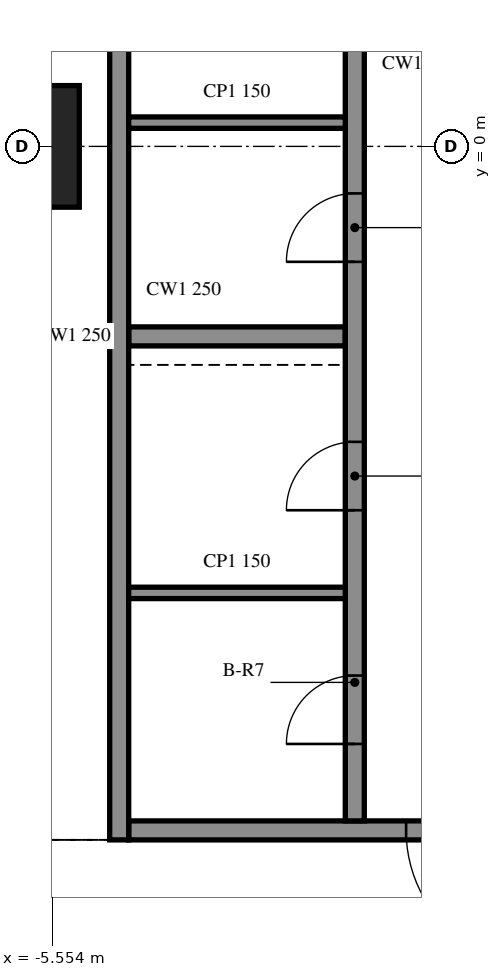
"""IFC4 building model, lengths in metres.
Left out: names, types, materials, properties, quantities, classifications, styles, units other than length and angle.
Written with IfcOpenShell. Run it as: python <this file> out.ifc"""

import sys

from ifc_helpers import new_model, si_unit, direction, frame, frame_2d, origin, origin_2d, place, context, subcontext, project, spatial, rectangle, extrude, element, fill, save


model = new_model("IFC4")
c1 = context("Model", 3, precision=1e-05, world=origin(), true_north=direction((0.0, 1.0)))
c2 = subcontext(c1, "Body", "Model", "MODEL_VIEW")
j1 = project(units=[si_unit("LENGTHUNIT", "METRE"), si_unit("PLANEANGLEUNIT", "RADIAN")], contexts=[c1])
p1 = place(None, origin())
s1 = spatial("IfcSite", under=j1, at=p1, CompositionType="ELEMENT")
p2 = place(p1, origin())
s2 = spatial("IfcBuilding", under=s1, at=p2, CompositionType="ELEMENT")
p3 = place(p2, frame((0.0, 0.0, 41.6)))
s3 = spatial("IfcBuildingStorey", under=s2, at=p3, CompositionType="ELEMENT", Elevation=41.6)
p4 = place(p3, frame((-6.0, 0.0, -0.55), z_axis=(0.0, 0.0, 1.0), x_axis=(1.0, 0.0, 0.0)))
e1 = element("IfcColumn", 1, at=p4, inside=s3, PredefinedType="COLUMN", context=c2, shape_type="SweptSolid", body=[
    extrude(rectangle(XDim=1.6, YDim=1.6, at=origin_2d()), origin(), (0.0, 0.0, 1.0), 4.61),
])
p5 = place(p3, frame((-4.675, 15.125, 0.0), z_axis=(0.0, 0.0, 1.0), x_axis=(0.0, -1.0, 0.0)))
e2 = element("IfcWall", 2, at=p5, inside=s3, PredefinedType="SOLIDWALL", context=c2, shape_type="SweptSolid", body=[
    extrude(rectangle(XDim=24.25, YDim=0.25, at=frame_2d((12.125, 0.0))), origin(), (0.0, 0.0, 1.0), 4.06),
])
p6 = place(p3, frame((4.55, -9.0, 0.0), z_axis=(0.0, 0.0, 1.0), x_axis=(-1.0, 0.0, 0.0)))
e3 = element("IfcWall", 3, at=p6, inside=s3, PredefinedType="SOLIDWALL", context=c2, shape_type="SweptSolid", body=[
    extrude(rectangle(XDim=9.1, YDim=0.25, at=frame_2d((4.55, 0.0))), origin(), (0.0, 0.0, 1.0), 4.06),
])
p7 = place(p6, frame((3.65, 0.0, 0.0)))
e4 = element("IfcOpeningElement", 4, at=p7, cuts=e3, PredefinedType="OPENING", context=c2, shape_type="SweptSolid", body=[
    extrude(rectangle(XDim=1.8, YDim=2.1, at=frame_2d((0.9, 1.05))), frame((0.0, 0.135, 0.0), z_axis=(0.0, -1.0, 0.0), x_axis=(1.0, 0.0, 0.0)), (0.0, 0.0, 1.0), 0.27),
])
p8 = place(p3, frame((-1.575, -8.875, 0.0), z_axis=(0.0, 0.0, 1.0), x_axis=(0.0, 1.0, 0.0)))
e5 = element("IfcWall", 5, at=p8, inside=s3, PredefinedType="SOLIDWALL", context=c2, shape_type="SweptSolid", body=[
    extrude(rectangle(XDim=23.75, YDim=0.25, at=frame_2d((11.875, 0.0))), origin(), (0.0, 0.0, 1.0), 4.06),
])
p9 = place(p8, frame((7.356, 0.0, 0.0)))
e6 = element("IfcOpeningElement", 6, at=p9, cuts=e5, PredefinedType="OPENING", context=c2, shape_type="SweptSolid", body=[
    extrude(rectangle(XDim=0.9, YDim=2.1, at=frame_2d((0.45, 1.05))), frame((0.0, 0.135, 0.0), z_axis=(0.0, -1.0, 0.0), x_axis=(1.0, 0.0, 0.0)), (0.0, 0.0, 1.0), 0.27),
])
p10 = place(p8, frame((11.425, 0.0, 0.0)))
e7 = element("IfcOpeningElement", 7, at=p10, cuts=e5, PredefinedType="OPENING", context=c2, shape_type="SweptSolid", body=[
    extrude(rectangle(XDim=0.9, YDim=2.1, at=frame_2d((0.45, 1.05))), frame((0.0, 0.135, 0.0), z_axis=(0.0, -1.0, 0.0), x_axis=(1.0, 0.0, 0.0)), (0.0, 0.0, 1.0), 0.27),
])
p11 = place(p8, frame((15.494, 0.0, 0.0)))
e8 = element("IfcOpeningElement", 8, at=p11, cuts=e5, PredefinedType="OPENING", context=c2, shape_type="SweptSolid", body=[
    extrude(rectangle(XDim=0.9, YDim=2.1, at=frame_2d((0.45, 1.05))), frame((0.0, 0.135, 0.0), z_axis=(0.0, -1.0, 0.0), x_axis=(1.0, 0.0, 0.0)), (0.0, 0.0, 1.0), 0.27),
])
p12 = place(p8, frame((1.012, 0.0, 0.0)))
e9 = element("IfcOpeningElement", 9, at=p12, cuts=e5, PredefinedType="OPENING", context=c2, shape_type="SweptSolid", body=[
    extrude(rectangle(XDim=0.9, YDim=2.1, at=frame_2d((0.45, 1.05))), frame((0.0, 0.135, 0.0), z_axis=(0.0, -1.0, 0.0), x_axis=(1.0, 0.0, 0.0)), (0.0, 0.0, 1.0), 0.27),
])
p13 = place(p8, frame((4.087, 0.0, 0.0)))
e10 = element("IfcOpeningElement", 10, at=p13, cuts=e5, PredefinedType="OPENING", context=c2, shape_type="SweptSolid", body=[
    extrude(rectangle(XDim=0.9, YDim=2.1, at=frame_2d((0.45, 1.05))), frame((0.0, 0.135, 0.0), z_axis=(0.0, -1.0, 0.0), x_axis=(1.0, 0.0, 0.0)), (0.0, 0.0, 1.0), 0.27),
])
p14 = place(p8, frame((18.262, 0.0, 0.0)))
e11 = element("IfcOpeningElement", 11, at=p14, cuts=e5, PredefinedType="OPENING", context=c2, shape_type="SweptSolid", body=[
    extrude(rectangle(XDim=0.9, YDim=2.1, at=frame_2d((0.45, 1.05))), frame((0.0, 0.135, 0.0), z_axis=(0.0, -1.0, 0.0), x_axis=(1.0, 0.0, 0.0)), (0.0, 0.0, 1.0), 0.27),
])
p15 = place(p8, frame((20.3, 0.0, 0.0)))
e12 = element("IfcOpeningElement", 12, at=p15, cuts=e5, PredefinedType="OPENING", context=c2, shape_type="SweptSolid", body=[
    extrude(rectangle(XDim=0.9, YDim=2.1, at=frame_2d((0.45, 1.05))), frame((0.0, 0.135, 0.0), z_axis=(0.0, -1.0, 0.0), x_axis=(1.0, 0.0, 0.0)), (0.0, 0.0, 1.0), 0.27),
])
p16 = place(p8, frame((22.337, 0.0, 0.0)))
e13 = element("IfcOpeningElement", 13, at=p16, cuts=e5, PredefinedType="OPENING", context=c2, shape_type="SweptSolid", body=[
    extrude(rectangle(XDim=0.9, YDim=2.1, at=frame_2d((0.45, 1.05))), frame((0.0, 0.135, 0.0), z_axis=(0.0, -1.0, 0.0), x_axis=(1.0, 0.0, 0.0)), (0.0, 0.0, 1.0), 0.27),
])
p17 = place(p3, frame((-4.55, -2.5, 0.0), z_axis=(0.0, 0.0, 1.0), x_axis=(1.0, 0.0, 0.0)))
e14 = element("IfcWall", 14, at=p17, inside=s3, PredefinedType="SOLIDWALL", context=c2, shape_type="SweptSolid", body=[
    extrude(rectangle(XDim=2.85, YDim=0.25, at=frame_2d((1.425, 0.0))), origin(), (0.0, 0.0, 1.0), 4.06),
])
for number, where, z_axis, x_axis in (
    (15, (-4.55, 0.312, 0.0), (0.0, 0.0, 1.0), (1.0, 0.0, 0.0)),
    (16, (-4.55, -5.875, 0.0), (0.0, 0.0, 1.0), (1.0, 0.0, 0.0)),
):
    element("IfcWall", number, at=place(p3, frame(where, z_axis=z_axis, x_axis=x_axis)), inside=s3, PredefinedType="PARTITIONING", context=c2, shape_type="SweptSolid", body=[
        extrude(rectangle(XDim=2.85, YDim=0.15, at=frame_2d((1.425, 0.0))), origin(), (0.0, 0.0, 1.0), 4.06),
    ])
p18 = place(p7, origin())
e17 = element("IfcDoor", 17, at=p18, inside=s3, OperationType="DOUBLE_DOOR_SINGLE_SWING", PredefinedType="DOOR", context=c2, shape_type="SweptSolid", body=[
    extrude(rectangle(XDim=1.8, YDim=2.1, at=frame_2d((0.9, 1.05))), frame((0.0, 0.025, 0.0), z_axis=(0.0, -1.0, 0.0), x_axis=(1.0, 0.0, 0.0)), (0.0, 0.0, 1.0), 0.05),
])
fill(e4, e17)
p19 = place(p9, origin())
e18 = element("IfcDoor", 18, at=p19, inside=s3, OperationType="SINGLE_SWING_LEFT", PredefinedType="DOOR", context=c2, shape_type="SweptSolid", body=[
    extrude(rectangle(XDim=0.9, YDim=2.1, at=frame_2d((0.45, 1.05))), frame((0.0, 0.025, 0.0), z_axis=(0.0, -1.0, 0.0), x_axis=(1.0, 0.0, 0.0)), (0.0, 0.0, 1.0), 0.05),
])
fill(e6, e18)
p20 = place(p12, origin())
e19 = element("IfcDoor", 19, at=p20, inside=s3, OperationType="SINGLE_SWING_LEFT", PredefinedType="DOOR", context=c2, shape_type="SweptSolid", body=[
    extrude(rectangle(XDim=0.9, YDim=2.1, at=frame_2d((0.45, 1.05))), frame((0.0, 0.025, 0.0), z_axis=(0.0, -1.0, 0.0), x_axis=(1.0, 0.0, 0.0)), (0.0, 0.0, 1.0), 0.05),
])
fill(e9, e19)
p21 = place(p13, origin())
e20 = element("IfcDoor", 20, at=p21, inside=s3, OperationType="SINGLE_SWING_RIGHT", PredefinedType="DOOR", context=c2, shape_type="SweptSolid", body=[
    extrude(rectangle(XDim=0.9, YDim=2.1, at=frame_2d((0.45, 1.05))), frame((0.0, 0.025, 0.0), z_axis=(0.0, -1.0, 0.0), x_axis=(1.0, 0.0, 0.0)), (0.0, 0.0, 1.0), 0.05),
])
fill(e10, e20)
save(model, sys.argv[1])
